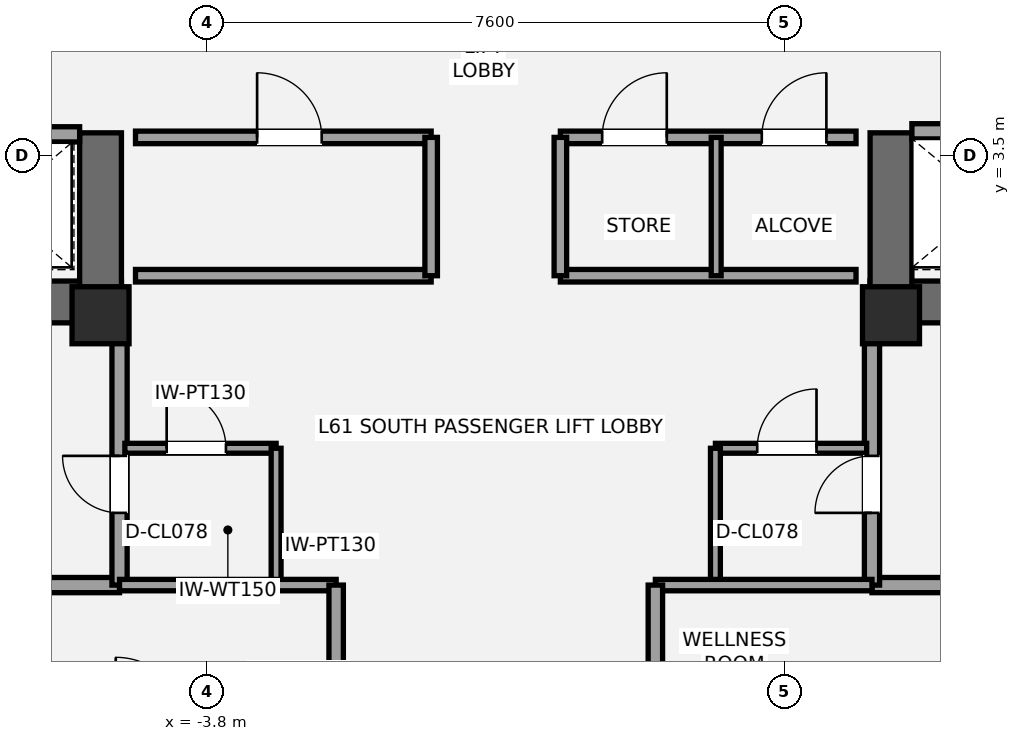
"""IFC4 building model, lengths in metres.
Left out: names, types, materials, properties, quantities, classifications, styles, units other than length and angle.
Written with IfcOpenShell. Run it as: python <this file> out.ifc"""

import sys

from ifc_helpers import new_model, si_unit, direction, frame, frame_2d, origin, origin_2d, place, context, subcontext, project, spatial, rectangle, extrude, element, fill, save


model = new_model("IFC4")
c1 = context("Model", 3, precision=1e-05, world=origin(), true_north=direction((0.0, 1.0)))
c2 = subcontext(c1, "Body", "Model", "MODEL_VIEW")
j1 = project(units=[si_unit("LENGTHUNIT", "METRE"), si_unit("PLANEANGLEUNIT", "RADIAN")], contexts=[c1])
p1 = place(None, origin())
s1 = spatial("IfcSite", under=j1, at=p1, CompositionType="ELEMENT")
p2 = place(p1, origin())
s2 = spatial("IfcBuilding", under=s1, at=p2, CompositionType="ELEMENT")
p3 = place(p2, frame((0.0, 0.0, 219.45)))
s3 = spatial("IfcBuildingStorey", under=s2, at=p3, CompositionType="ELEMENT", Elevation=219.45)
p4 = place(p3, frame((-4.925, 1.575, 0.0), z_axis=(0.0, 0.0, 1.0), x_axis=(-1.0, 0.0, 0.0)))
e1 = element("IfcWall", 1, at=p4, inside=s3, PredefinedType="SHEAR", context=c2, shape_type="SweptSolid", body=[
    extrude(rectangle(XDim=8.775, YDim=0.55, at=frame_2d((4.387, 0.0))), origin(), (0.0, 0.0, 1.0), 3.15),
])
p5 = place(p4, frame((5.375, 0.0, 0.0)))
e2 = element("IfcOpeningElement", 2, at=p5, cuts=e1, PredefinedType="OPENING", context=c2, shape_type="SweptSolid", body=[
    extrude(rectangle(XDim=1.05, YDim=2.15, at=frame_2d((0.525, 1.075))), frame((0.0, 0.285, 0.0), z_axis=(0.0, -1.0, 0.0), x_axis=(1.0, 0.0, 0.0)), (0.0, 0.0, 1.0), 0.57),
])
p6 = place(p4, frame((3.705, 0.0, 0.0)))
e3 = element("IfcOpeningElement", 3, at=p6, cuts=e1, PredefinedType="OPENING", context=c2, shape_type="SweptSolid", body=[
    extrude(rectangle(XDim=1.1, YDim=2.2, at=frame_2d((0.55, 1.1))), frame((0.0, 0.285, 0.0), z_axis=(0.0, -1.0, 0.0), x_axis=(1.0, 0.0, 0.0)), (0.0, 0.0, 1.0), 0.57),
])
p7 = place(p3, frame((-5.2, 1.3, 0.0), z_axis=(0.0, 0.0, 1.0), x_axis=(0.0, 1.0, 0.0)))
e4 = element("IfcWall", 4, at=p7, inside=s3, PredefinedType="SHEAR", context=c2, shape_type="SweptSolid", body=[
    extrude(rectangle(XDim=2.5, YDim=0.55, at=frame_2d((1.25, 0.0))), origin(), (0.0, 0.0, 1.0), 3.15),
])
p8 = place(p3, frame((13.7, 1.575, 0.0), z_axis=(0.0, 0.0, 1.0), x_axis=(-1.0, 0.0, 0.0)))
e5 = element("IfcWall", 5, at=p8, inside=s3, PredefinedType="SHEAR", context=c2, shape_type="SweptSolid", body=[
    extrude(rectangle(XDim=8.775, YDim=0.55, at=frame_2d((4.387, 0.0))), origin(), (0.0, 0.0, 1.0), 3.15),
])
p9 = place(p8, frame((2.35, 0.0, 0.0)))
e6 = element("IfcOpeningElement", 6, at=p9, cuts=e5, PredefinedType="OPENING", context=c2, shape_type="SweptSolid", body=[
    extrude(rectangle(XDim=1.05, YDim=2.15, at=frame_2d((0.525, 1.075))), frame((0.0, 0.285, 0.0), z_axis=(0.0, -1.0, 0.0), x_axis=(1.0, 0.0, 0.0)), (0.0, 0.0, 1.0), 0.57),
])
p10 = place(p8, frame((4.35, 0.0, 0.0)))
e7 = element("IfcOpeningElement", 7, at=p10, cuts=e5, PredefinedType="OPENING", context=c2, shape_type="SweptSolid", body=[
    extrude(rectangle(XDim=1.1, YDim=2.2, at=frame_2d((0.55, 1.1))), frame((0.0, 0.285, 0.0), z_axis=(0.0, -1.0, 0.0), x_axis=(1.0, 0.0, 0.0)), (0.0, 0.0, 1.0), 0.57),
])
p11 = place(p3, frame((5.2, 1.3, 0.0), z_axis=(0.0, 0.0, 1.0), x_axis=(0.0, 1.0, 0.0)))
e8 = element("IfcWall", 8, at=p11, inside=s3, PredefinedType="SHEAR", context=c2, shape_type="SweptSolid", body=[
    extrude(rectangle(XDim=2.5, YDim=0.55, at=frame_2d((1.25, 0.0))), origin(), (0.0, 0.0, 1.0), 3.15),
])
for number, where, z_axis, x_axis in (
    (9, (-5.2, 1.4, 0.0), (0.0, 0.0, 1.0), (1.0, 0.0, 0.0)),
    (10, (5.2, 1.4, 0.0), (0.0, 0.0, 1.0), (1.0, 0.0, 0.0)),
):
    element("IfcColumn", number, at=place(p3, frame(where, z_axis=z_axis, x_axis=x_axis)), inside=s3, PredefinedType="PILASTER", context=c2, shape_type="SweptSolid", body=[
        extrude(rectangle(XDim=0.75, YDim=0.75, at=origin_2d()), origin(), (0.0, 0.0, 1.0), 3.15),
    ])
p12 = place(p3, frame((-7.2, -2.15, 0.0), z_axis=(0.0, 0.0, 1.0), x_axis=(1.0, 0.0, 0.0)))
e11 = element("IfcWall", 11, at=p12, inside=s3, PredefinedType="SOLIDWALL", context=c2, shape_type="SweptSolid", body=[
    extrude(rectangle(XDim=2.25, YDim=0.2, at=frame_2d((1.125, 0.0))), origin(), (0.0, 0.0, 1.0), 2.423),
])
p13 = place(p3, frame((-4.95, -2.15, 0.0), z_axis=(0.0, 0.0, 1.0), x_axis=(0.0, 1.0, 0.0)))
e12 = element("IfcWall", 12, at=p13, inside=s3, PredefinedType="SOLIDWALL", context=c2, shape_type="SweptSolid", body=[
    extrude(rectangle(XDim=3.5, YDim=0.2, at=frame_2d((1.75, 0.0))), origin(), (0.0, 0.0, 1.0), 2.423),
])
p14 = place(p13, frame((0.95, 0.0, 0.0)))
e13 = element("IfcOpeningElement", 13, at=p14, cuts=e12, PredefinedType="OPENING", context=c2, shape_type="SweptSolid", body=[
    extrude(rectangle(XDim=0.75, YDim=2.1, at=frame_2d((0.375, 1.05))), frame((0.0, 0.11, 0.0), z_axis=(0.0, -1.0, 0.0), x_axis=(1.0, 0.0, 0.0)), (0.0, 0.0, 1.0), 0.22),
])
p15 = place(p3, frame((4.95, -2.15, 0.0), z_axis=(0.0, 0.0, 1.0), x_axis=(1.0, 0.0, 0.0)))
e14 = element("IfcWall", 14, at=p15, inside=s3, PredefinedType="SOLIDWALL", context=c2, shape_type="SweptSolid", body=[
    extrude(rectangle(XDim=2.25, YDim=0.2, at=frame_2d((1.125, 0.0))), origin(), (0.0, 0.0, 1.0), 2.97),
])
p16 = place(p3, frame((4.95, -2.15, 0.0), z_axis=(0.0, 0.0, 1.0), x_axis=(0.0, 1.0, 0.0)))
e15 = element("IfcWall", 15, at=p16, inside=s3, PredefinedType="SOLIDWALL", context=c2, shape_type="SweptSolid", body=[
    extrude(rectangle(XDim=3.5, YDim=0.2, at=frame_2d((1.75, 0.0))), origin(), (0.0, 0.0, 1.0), 2.423),
])
p17 = place(p16, frame((0.95, 0.0, 0.0)))
e16 = element("IfcOpeningElement", 16, at=p17, cuts=e15, PredefinedType="OPENING", context=c2, shape_type="SweptSolid", body=[
    extrude(rectangle(XDim=0.75, YDim=2.1, at=frame_2d((0.375, 1.05))), frame((0.0, 0.11, 0.0), z_axis=(0.0, -1.0, 0.0), x_axis=(1.0, 0.0, 0.0)), (0.0, 0.0, 1.0), 0.22),
])
p18 = place(p3, frame((-4.88, -0.35, 0.0), z_axis=(0.0, 0.0, 1.0), x_axis=(1.0, 0.0, 0.0)))
e17 = element("IfcWall", 17, at=p18, inside=s3, PredefinedType="PARTITIONING", context=c2, shape_type="SweptSolid", body=[
    extrude(rectangle(XDim=1.99, YDim=0.13, at=frame_2d((0.995, 0.0))), origin(), (0.0, 0.0, 1.0), 2.97),
])
p19 = place(p18, frame((0.55, 0.0, 0.0)))
e18 = element("IfcOpeningElement", 18, at=p19, cuts=e17, PredefinedType="OPENING", context=c2, shape_type="SweptSolid", body=[
    extrude(rectangle(XDim=0.78, YDim=2.1, at=frame_2d((0.39, 1.05))), frame((0.0, 0.075, 0.0), z_axis=(0.0, -1.0, 0.0), x_axis=(1.0, 0.0, 0.0)), (0.0, 0.0, 1.0), 0.15),
])
p20 = place(p3, frame((-2.89, -2.15, 0.0), z_axis=(0.0, 0.0, 1.0), x_axis=(0.0, 1.0, 0.0)))
e19 = element("IfcWall", 19, at=p20, inside=s3, PredefinedType="PARTITIONING", context=c2, shape_type="SweptSolid", body=[
    extrude(rectangle(XDim=1.8, YDim=0.13, at=frame_2d((0.9, 0.0))), origin(), (0.0, 0.0, 1.0), 2.423),
])
p21 = place(p3, frame((2.89, -0.35, 0.0), z_axis=(0.0, 0.0, 1.0), x_axis=(1.0, 0.0, 0.0)))
e20 = element("IfcWall", 20, at=p21, inside=s3, PredefinedType="PARTITIONING", context=c2, shape_type="SweptSolid", body=[
    extrude(rectangle(XDim=1.99, YDim=0.13, at=frame_2d((0.995, 0.0))), origin(), (0.0, 0.0, 1.0), 2.97),
])
p22 = place(p21, frame((0.55, 0.0, 0.0)))
e21 = element("IfcOpeningElement", 21, at=p22, cuts=e20, PredefinedType="OPENING", context=c2, shape_type="SweptSolid", body=[
    extrude(rectangle(XDim=0.78, YDim=2.1, at=frame_2d((0.39, 1.05))), frame((0.0, 0.075, 0.0), z_axis=(0.0, -1.0, 0.0), x_axis=(1.0, 0.0, 0.0)), (0.0, 0.0, 1.0), 0.15),
])
p23 = place(p3, frame((2.89, -2.15, 0.0), z_axis=(0.0, 0.0, 1.0), x_axis=(0.0, 1.0, 0.0)))
e22 = element("IfcWall", 22, at=p23, inside=s3, PredefinedType="PARTITIONING", context=c2, shape_type="SweptSolid", body=[
    extrude(rectangle(XDim=1.8, YDim=0.13, at=frame_2d((0.9, 0.0))), origin(), (0.0, 0.0, 1.0), 2.97),
])
p24 = place(p3, frame((-9.78, 3.78, 0.0), z_axis=(0.0, 0.0, 1.0), x_axis=(1.0, 0.0, 0.0)))
e23 = element("IfcWall", 23, at=p24, inside=s3, PredefinedType="SOLIDWALL", context=c2, shape_type="SweptSolid", body=[
    extrude(rectangle(XDim=4.305, YDim=0.2, at=frame_2d((2.152, 0.0))), origin(), (0.0, 0.0, 1.0), 2.97),
])
p25 = place(p24, frame((2.72, 0.0, 0.0)))
e24 = element("IfcOpeningElement", 24, at=p25, cuts=e23, PredefinedType="OPENING", context=c2, shape_type="SweptSolid", body=[
    extrude(rectangle(XDim=1.1, YDim=2.2, at=frame_2d((0.55, 1.1))), frame((0.0, 0.11, 0.0), z_axis=(0.0, -1.0, 0.0), x_axis=(1.0, 0.0, 0.0)), (0.0, 0.0, 1.0), 0.22),
])
p26 = place(p3, frame((5.475, 3.82, 0.0), z_axis=(0.0, 0.0, 1.0), x_axis=(1.0, 0.0, 0.0)))
e25 = element("IfcWall", 25, at=p26, inside=s3, PredefinedType="SOLIDWALL", context=c2, shape_type="SweptSolid", body=[
    extrude(rectangle(XDim=4.305, YDim=0.2, at=frame_2d((2.152, 0.0))), origin(), (0.0, 0.0, 1.0), 2.97),
])
p27 = place(p26, frame((0.65, 0.0, 0.0)))
e26 = element("IfcOpeningElement", 26, at=p27, cuts=e25, PredefinedType="OPENING", context=c2, shape_type="SweptSolid", body=[
    extrude(rectangle(XDim=1.2, YDim=2.2, at=frame_2d((0.6, 1.1))), frame((0.0, 0.11, 0.0), z_axis=(0.0, -1.0, 0.0), x_axis=(1.0, 0.0, 0.0)), (0.0, 0.0, 1.0), 0.22),
])
p28 = place(p3, frame((-4.74, 1.92, 0.0), z_axis=(0.0, 0.0, 1.0), x_axis=(1.0, 0.0, 0.0)))
e27 = element("IfcWall", 27, at=p28, inside=s3, PredefinedType="PARTITIONING", context=c2, shape_type="SweptSolid", body=[
    extrude(rectangle(XDim=3.89, YDim=0.165, at=frame_2d((1.945, 0.0))), origin(), (0.0, 0.0, 1.0), 2.11),
])
p29 = place(p3, frame((-4.74, 3.74, 0.0), z_axis=(0.0, 0.0, 1.0), x_axis=(1.0, 0.0, 0.0)))
e28 = element("IfcWall", 28, at=p29, inside=s3, PredefinedType="PARTITIONING", context=c2, shape_type="SweptSolid", body=[
    extrude(rectangle(XDim=3.89, YDim=0.165, at=frame_2d((1.945, 0.0))), origin(), (0.0, 0.0, 1.0), 2.97),
])
p30 = place(p29, frame((1.6, 0.0, 0.0)))
e29 = element("IfcOpeningElement", 29, at=p30, cuts=e28, PredefinedType="OPENING", context=c2, shape_type="SweptSolid", body=[
    extrude(rectangle(XDim=0.85, YDim=2.1, at=frame_2d((0.425, 1.05))), frame((0.0, 0.093, 0.0), z_axis=(0.0, -1.0, 0.0), x_axis=(1.0, 0.0, 0.0)), (0.0, 0.0, 1.0), 0.185),
])
p31 = place(p3, frame((-0.85, 1.92, 0.0), z_axis=(0.0, 0.0, 1.0), x_axis=(0.0, 1.0, 0.0)))
e30 = element("IfcWall", 30, at=p31, inside=s3, PredefinedType="PARTITIONING", context=c2, shape_type="SweptSolid", body=[
    extrude(rectangle(XDim=1.82, YDim=0.165, at=frame_2d((0.91, 0.0))), origin(), (0.0, 0.0, 1.0), 2.97),
])
p32 = place(p3, frame((0.85, 1.92, 0.0), z_axis=(0.0, 0.0, 1.0), x_axis=(1.0, 0.0, 0.0)))
e31 = element("IfcWall", 31, at=p32, inside=s3, PredefinedType="PARTITIONING", context=c2, shape_type="SweptSolid", body=[
    extrude(rectangle(XDim=3.89, YDim=0.165, at=frame_2d((1.945, 0.0))), origin(), (0.0, 0.0, 1.0), 2.11),
])
p33 = place(p3, frame((0.85, 3.74, 0.0), z_axis=(0.0, 0.0, 1.0), x_axis=(1.0, 0.0, 0.0)))
e32 = element("IfcWall", 32, at=p33, inside=s3, PredefinedType="PARTITIONING", context=c2, shape_type="SweptSolid", body=[
    extrude(rectangle(XDim=3.89, YDim=0.165, at=frame_2d((1.945, 0.0))), origin(), (0.0, 0.0, 1.0), 2.97),
])
p34 = place(p33, frame((0.55, 0.0, 0.0)))
e33 = element("IfcOpeningElement", 33, at=p34, cuts=e32, PredefinedType="OPENING", context=c2, shape_type="SweptSolid", body=[
    extrude(rectangle(XDim=0.85, YDim=2.1, at=frame_2d((0.425, 1.05))), frame((0.0, 0.093, 0.0), z_axis=(0.0, -1.0, 0.0), x_axis=(1.0, 0.0, 0.0)), (0.0, 0.0, 1.0), 0.185),
])
p35 = place(p33, frame((2.65, 0.0, 0.0)))
e34 = element("IfcOpeningElement", 34, at=p35, cuts=e32, PredefinedType="OPENING", context=c2, shape_type="SweptSolid", body=[
    extrude(rectangle(XDim=0.85, YDim=2.1, at=frame_2d((0.425, 1.05))), frame((0.0, 0.093, 0.0), z_axis=(0.0, -1.0, 0.0), x_axis=(1.0, 0.0, 0.0)), (0.0, 0.0, 1.0), 0.185),
])
p36 = place(p3, frame((0.85, 1.92, 0.0), z_axis=(0.0, 0.0, 1.0), x_axis=(0.0, 1.0, 0.0)))
e35 = element("IfcWall", 35, at=p36, inside=s3, PredefinedType="PARTITIONING", context=c2, shape_type="SweptSolid", body=[
    extrude(rectangle(XDim=1.82, YDim=0.165, at=frame_2d((0.91, 0.0))), origin(), (0.0, 0.0, 1.0), 2.97),
])
p37 = place(p3, frame((2.9, 1.92, 0.0), z_axis=(0.0, 0.0, 1.0), x_axis=(0.0, 1.0, 0.0)))
e36 = element("IfcWall", 36, at=p37, inside=s3, PredefinedType="PARTITIONING", context=c2, shape_type="SweptSolid", body=[
    extrude(rectangle(XDim=1.82, YDim=0.13, at=frame_2d((0.91, 0.0))), origin(), (0.0, 0.0, 1.0), 2.97),
])
p38 = place(p3, frame((-4.95, -2.15, 0.0), z_axis=(0.0, 0.0, 1.0), x_axis=(1.0, 0.0, 0.0)))
e37 = element("IfcWall", 37, at=p38, inside=s3, PredefinedType="PLUMBINGWALL", context=c2, shape_type="SweptSolid", body=[
    extrude(rectangle(XDim=2.85, YDim=0.15, at=frame_2d((1.425, 0.0))), origin(), (0.0, 0.0, 1.0), 2.423),
])
p39 = place(p3, frame((-2.1, -4.05, 0.0), z_axis=(0.0, 0.0, 1.0), x_axis=(0.0, 1.0, 0.0)))
e38 = element("IfcWall", 38, at=p39, inside=s3, PredefinedType="PLUMBINGWALL", context=c2, shape_type="SweptSolid", body=[
    extrude(rectangle(XDim=1.9, YDim=0.19, at=frame_2d((0.95, 0.0))), origin(), (0.0, 0.0, 1.0), 2.423),
])
p40 = place(p3, frame((2.1, -2.15, 0.0), z_axis=(0.0, 0.0, 1.0), x_axis=(1.0, 0.0, 0.0)))
e39 = element("IfcWall", 39, at=p40, inside=s3, PredefinedType="PLUMBINGWALL", context=c2, shape_type="SweptSolid", body=[
    extrude(rectangle(XDim=2.85, YDim=0.15, at=frame_2d((1.425, 0.0))), origin(), (0.0, 0.0, 1.0), 2.97),
])
p41 = place(p3, frame((2.1, -4.05, 0.0), z_axis=(0.0, 0.0, 1.0), x_axis=(0.0, 1.0, 0.0)))
e40 = element("IfcWall", 40, at=p41, inside=s3, PredefinedType="PLUMBINGWALL", context=c2, shape_type="SweptSolid", body=[
    extrude(rectangle(XDim=1.9, YDim=0.19, at=frame_2d((0.95, 0.0))), origin(), (0.0, 0.0, 1.0), 2.97),
])
p42 = place(p14, origin())
e41 = element("IfcDoor", 41, at=p42, inside=s3, OperationType="SINGLE_SWING_RIGHT", PredefinedType="DOOR", context=c2, shape_type="SweptSolid", body=[
    extrude(rectangle(XDim=0.75, YDim=2.1, at=frame_2d((0.375, 1.05))), frame((0.0, 0.025, 0.0), z_axis=(0.0, -1.0, 0.0), x_axis=(1.0, 0.0, 0.0)), (0.0, 0.0, 1.0), 0.05),
])
fill(e13, e41)
p43 = place(p17, origin())
e42 = element("IfcDoor", 42, at=p43, inside=s3, OperationType="SINGLE_SWING_LEFT", PredefinedType="DOOR", context=c2, shape_type="SweptSolid", body=[
    extrude(rectangle(XDim=0.75, YDim=2.1, at=frame_2d((0.375, 1.05))), frame((0.0, 0.025, 0.0), z_axis=(0.0, -1.0, 0.0), x_axis=(1.0, 0.0, 0.0)), (0.0, 0.0, 1.0), 0.05),
])
fill(e16, e42)
p44 = place(p19, origin())
e43 = element("IfcDoor", 43, at=p44, inside=s3, OperationType="SINGLE_SWING_LEFT", PredefinedType="DOOR", context=c2, shape_type="SweptSolid", body=[
    extrude(rectangle(XDim=0.78, YDim=2.1, at=frame_2d((0.39, 1.05))), frame((0.0, 0.025, 0.0), z_axis=(0.0, -1.0, 0.0), x_axis=(1.0, 0.0, 0.0)), (0.0, 0.0, 1.0), 0.05),
])
fill(e18, e43)
p45 = place(p22, origin())
e44 = element("IfcDoor", 44, at=p45, inside=s3, OperationType="SINGLE_SWING_RIGHT", PredefinedType="DOOR", context=c2, shape_type="SweptSolid", body=[
    extrude(rectangle(XDim=0.78, YDim=2.1, at=frame_2d((0.39, 1.05))), frame((0.0, 0.025, 0.0), z_axis=(0.0, -1.0, 0.0), x_axis=(1.0, 0.0, 0.0)), (0.0, 0.0, 1.0), 0.05),
])
fill(e21, e44)
p46 = place(p30, origin())
e45 = element("IfcDoor", 45, at=p46, inside=s3, OperationType="SINGLE_SWING_LEFT", PredefinedType="DOOR", context=c2, shape_type="SweptSolid", body=[
    extrude(rectangle(XDim=0.85, YDim=2.1, at=frame_2d((0.425, 1.05))), frame((0.0, 0.025, 0.0), z_axis=(0.0, -1.0, 0.0), x_axis=(1.0, 0.0, 0.0)), (0.0, 0.0, 1.0), 0.05),
])
fill(e29, e45)
p47 = place(p34, origin())
e46 = element("IfcDoor", 46, at=p47, inside=s3, OperationType="SINGLE_SWING_RIGHT", PredefinedType="DOOR", context=c2, shape_type="SweptSolid", body=[
    extrude(rectangle(XDim=0.85, YDim=2.1, at=frame_2d((0.425, 1.05))), frame((0.0, 0.025, 0.0), z_axis=(0.0, -1.0, 0.0), x_axis=(1.0, 0.0, 0.0)), (0.0, 0.0, 1.0), 0.05),
])
fill(e33, e46)
p48 = place(p35, origin())
e47 = element("IfcDoor", 47, at=p48, inside=s3, OperationType="SINGLE_SWING_RIGHT", PredefinedType="DOOR", context=c2, shape_type="SweptSolid", body=[
    extrude(rectangle(XDim=0.85, YDim=2.1, at=frame_2d((0.425, 1.05))), frame((0.0, 0.025, 0.0), z_axis=(0.0, -1.0, 0.0), x_axis=(1.0, 0.0, 0.0)), (0.0, 0.0, 1.0), 0.05),
])
fill(e34, e47)
save(model, sys.argv[1])
